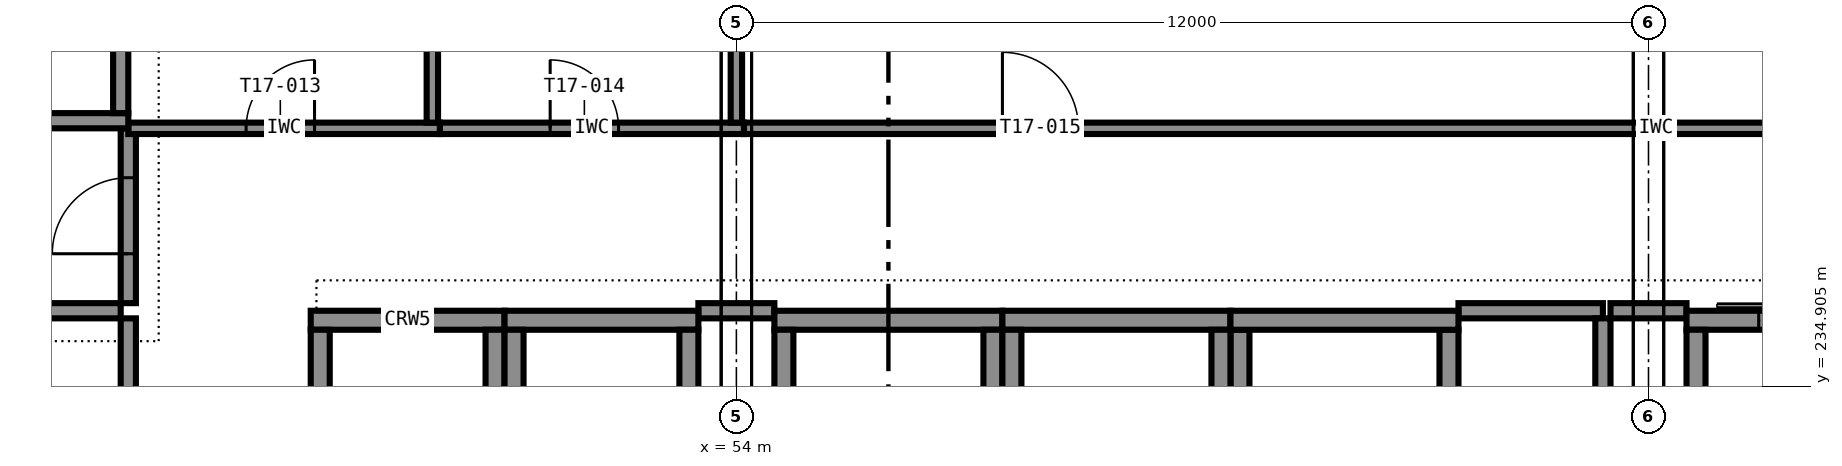
"""IFC4 building model, lengths in metres.
Left out: names, types, materials, properties, quantities, classifications, styles, units other than length and angle.
Written with IfcOpenShell. Run it as: python <this file> out.ifc"""

import sys

from ifc_helpers import new_model, si_unit, direction, frame, frame_2d, origin, place, context, subcontext, project, spatial, rectangle, extrude, element, fill, save


model = new_model("IFC4")
c1 = context("Model", 3, precision=1e-05, world=origin(), true_north=direction((0.0, 1.0)))
c2 = subcontext(c1, "Body", "Model", "MODEL_VIEW")
j1 = project(units=[si_unit("LENGTHUNIT", "METRE"), si_unit("PLANEANGLEUNIT", "RADIAN")], contexts=[c1])
p1 = place(None, origin())
s1 = spatial("IfcSite", under=j1, at=p1, CompositionType="ELEMENT")
p2 = place(p1, origin())
s2 = spatial("IfcBuilding", under=s1, at=p2, CompositionType="ELEMENT")
p3 = place(p2, frame((0.0, 0.0, 67.8)))
s3 = spatial("IfcBuildingStorey", under=s2, at=p3, CompositionType="ELEMENT", Elevation=67.8)
p4 = place(p3, frame((54.5, 235.775, 0.0), z_axis=(0.0, 0.0, 1.0), x_axis=(1.0, 0.0, 0.0)))
e1 = element("IfcWall", 1, at=p4, inside=s3, PredefinedType="SHEAR", context=c2, shape_type="SweptSolid", body=[
    extrude(rectangle(XDim=3.0, YDim=0.25, at=frame_2d((1.5, 0.0))), origin(), (0.0, 0.0, 1.0), 3.6),
])
for number, where, z_axis, x_axis in (
    (2, (54.625, 232.35, 0.0), (0.0, 0.0, 1.0), (0.0, 1.0, 0.0)),
    (3, (57.375, 232.35, 0.0), (0.0, 0.0, 1.0), (0.0, 1.0, 0.0)),
):
    element("IfcWall", number, at=place(p3, frame(where, z_axis=z_axis, x_axis=x_axis)), inside=s3, PredefinedType="SHEAR", context=c2, shape_type="SweptSolid", body=[
        extrude(rectangle(XDim=3.3, YDim=0.25, at=frame_2d((1.65, 0.0))), origin(), (0.0, 0.0, 1.0), 3.6),
    ])
p5 = place(p3, frame((57.5, 235.775, 0.0), z_axis=(0.0, 0.0, 1.0), x_axis=(1.0, 0.0, 0.0)))
e4 = element("IfcWall", 4, at=p5, inside=s3, PredefinedType="SHEAR", context=c2, shape_type="SweptSolid", body=[
    extrude(rectangle(XDim=3.0, YDim=0.25, at=frame_2d((1.5, 0.0))), origin(), (0.0, 0.0, 1.0), 3.6),
])
for number, where, z_axis, x_axis in (
    (5, (57.625, 232.35, 0.0), (0.0, 0.0, 1.0), (0.0, 1.0, 0.0)),
    (6, (60.375, 232.35, 0.0), (0.0, 0.0, 1.0), (0.0, 1.0, 0.0)),
):
    element("IfcWall", number, at=place(p3, frame(where, z_axis=z_axis, x_axis=x_axis)), inside=s3, PredefinedType="SHEAR", context=c2, shape_type="SweptSolid", body=[
        extrude(rectangle(XDim=3.3, YDim=0.25, at=frame_2d((1.65, 0.0))), origin(), (0.0, 0.0, 1.0), 3.6),
    ])
p6 = place(p3, frame((60.5, 235.775, 0.0), z_axis=(0.0, 0.0, 1.0), x_axis=(1.0, 0.0, 0.0)))
e7 = element("IfcWall", 7, at=p6, inside=s3, PredefinedType="SHEAR", context=c2, shape_type="SweptSolid", body=[
    extrude(rectangle(XDim=3.0, YDim=0.25, at=frame_2d((1.5, 0.0))), origin(), (0.0, 0.0, 1.0), 3.6),
])
for number, where, z_axis, x_axis in (
    (8, (60.625, 232.35, 0.0), (0.0, 0.0, 1.0), (0.0, 1.0, 0.0)),
    (9, (63.375, 232.35, 0.0), (0.0, 0.0, 1.0), (0.0, 1.0, 0.0)),
):
    element("IfcWall", number, at=place(p3, frame(where, z_axis=z_axis, x_axis=x_axis)), inside=s3, PredefinedType="SHEAR", context=c2, shape_type="SweptSolid", body=[
        extrude(rectangle(XDim=3.3, YDim=0.25, at=frame_2d((1.65, 0.0))), origin(), (0.0, 0.0, 1.0), 3.6),
    ])
p7 = place(p3, frame((66.5, 235.775, 0.0), z_axis=(0.0, 0.0, 1.0), x_axis=(1.0, 0.0, 0.0)))
e10 = element("IfcWall", 10, at=p7, inside=s3, PredefinedType="SHEAR", context=c2, shape_type="SweptSolid", body=[
    extrude(rectangle(XDim=3.0, YDim=0.25, at=frame_2d((1.5, 0.0))), origin(), (0.0, 0.0, 1.0), 3.6),
])
p8 = place(p7, frame((0.95, 0.0, 0.0)))
e11 = element("IfcOpeningElement", 11, at=p8, cuts=e10, PredefinedType="OPENING", context=c2, shape_type="SweptSolid", body=[
    extrude(rectangle(XDim=1.1, YDim=2.1, at=frame_2d((0.55, 1.05))), frame((0.0, 0.135, 0.0), z_axis=(0.0, -1.0, 0.0), x_axis=(1.0, 0.0, 0.0)), (0.0, 0.0, 1.0), 0.27),
])
p9 = place(p3, frame((66.625, 232.35, 0.0), z_axis=(0.0, 0.0, 1.0), x_axis=(0.0, 1.0, 0.0)))
e12 = element("IfcWall", 12, at=p9, inside=s3, PredefinedType="SHEAR", context=c2, shape_type="SweptSolid", body=[
    extrude(rectangle(XDim=3.3, YDim=0.25, at=frame_2d((1.65, 0.0))), origin(), (0.0, 0.0, 1.0), 3.6),
])
p10 = place(p3, frame((48.4, 235.775, 0.0), z_axis=(0.0, 0.0, 1.0), x_axis=(1.0, 0.0, 0.0)))
e13 = element("IfcWall", 13, at=p10, inside=s3, PredefinedType="SHEAR", context=c2, shape_type="SweptSolid", body=[
    extrude(rectangle(XDim=2.55, YDim=0.25, at=frame_2d((1.275, 0.0))), origin(), (0.0, 0.0, 1.0), 3.6),
])
for number, where, z_axis, x_axis in (
    (14, (48.525, 232.35, 0.0), (0.0, 0.0, 1.0), (0.0, 1.0, 0.0)),
    (15, (50.825, 232.35, 0.0), (0.0, 0.0, 1.0), (0.0, 1.0, 0.0)),
):
    element("IfcWall", number, at=place(p3, frame(where, z_axis=z_axis, x_axis=x_axis)), inside=s3, PredefinedType="SHEAR", context=c2, shape_type="SweptSolid", body=[
        extrude(rectangle(XDim=3.3, YDim=0.25, at=frame_2d((1.65, 0.0))), origin(), (0.0, 0.0, 1.0), 3.6),
    ])
p11 = place(p3, frame((50.95, 235.775, 0.0), z_axis=(0.0, 0.0, 1.0), x_axis=(1.0, 0.0, 0.0)))
e16 = element("IfcWall", 16, at=p11, inside=s3, PredefinedType="SHEAR", context=c2, shape_type="SweptSolid", body=[
    extrude(rectangle(XDim=2.55, YDim=0.25, at=frame_2d((1.275, 0.0))), origin(), (0.0, 0.0, 1.0), 3.6),
])
for number, where, z_axis, x_axis in (
    (17, (51.075, 232.35, 0.0), (0.0, 0.0, 1.0), (0.0, 1.0, 0.0)),
    (18, (53.375, 232.35, 0.0), (0.0, 0.0, 1.0), (0.0, 1.0, 0.0)),
):
    element("IfcWall", number, at=place(p3, frame(where, z_axis=z_axis, x_axis=x_axis)), inside=s3, PredefinedType="SHEAR", context=c2, shape_type="SweptSolid", body=[
        extrude(rectangle(XDim=3.3, YDim=0.25, at=frame_2d((1.65, 0.0))), origin(), (0.0, 0.0, 1.0), 3.6),
    ])
p12 = place(p3, frame((42.5, 238.4, 0.0), z_axis=(0.0, 0.0, 1.0), x_axis=(1.0, 0.0, 0.0)))
e19 = element("IfcWall", 19, at=p12, inside=s3, PredefinedType="SHEAR", context=c2, shape_type="SweptSolid", body=[
    extrude(rectangle(XDim=3.5, YDim=0.2, at=frame_2d((1.75, 0.0))), origin(), (0.0, 0.0, 1.0), 3.6),
])
p13 = place(p12, frame((1.15, 0.0, 0.0)))
e20 = element("IfcOpeningElement", 20, at=p13, cuts=e19, PredefinedType="OPENING", context=c2, shape_type="SweptSolid", body=[
    extrude(rectangle(XDim=1.2, YDim=2.1, at=frame_2d((0.6, 1.05))), frame((0.0, 0.11, 0.0), z_axis=(0.0, -1.0, 0.0), x_axis=(1.0, 0.0, 0.0)), (0.0, 0.0, 1.0), 0.22),
])
p14 = place(p3, frame((45.9, 238.5, 0.0), z_axis=(0.0, 0.0, 1.0), x_axis=(0.0, 1.0, 0.0)))
e21 = element("IfcWall", 21, at=p14, inside=s3, PredefinedType="SHEAR", context=c2, shape_type="SweptSolid", body=[
    extrude(rectangle(XDim=7.0, YDim=0.2, at=frame_2d((3.5, 0.0))), origin(), (0.0, 0.0, 1.0), 3.6),
])
p15 = place(p3, frame((42.2, 235.9, 0.0), z_axis=(0.0, 0.0, 1.0), x_axis=(1.0, 0.0, 0.0)))
e22 = element("IfcWall", 22, at=p15, inside=s3, PredefinedType="PARTITIONING", context=c2, shape_type="SweptSolid", body=[
    extrude(rectangle(XDim=3.7, YDim=0.2, at=frame_2d((1.85, 0.0))), origin(), (0.0, 0.0, 1.0), 3.4),
])
p16 = place(p3, frame((53.5, 235.9, 0.0), z_axis=(0.0, 0.0, 1.0), x_axis=(1.0, 0.0, 0.0)))
e23 = element("IfcWall", 23, at=p16, inside=s3, PredefinedType="PARTITIONING", context=c2, shape_type="SweptSolid", body=[
    extrude(rectangle(XDim=1.0, YDim=0.2, at=frame_2d((0.5, 0.0))), origin(), (0.0, 0.0, 1.0), 3.4),
])
p17 = place(p3, frame((63.5, 235.9, 0.0), z_axis=(0.0, 0.0, 1.0), x_axis=(1.0, 0.0, 0.0)))
e24 = element("IfcWall", 24, at=p17, inside=s3, PredefinedType="PARTITIONING", context=c2, shape_type="SweptSolid", body=[
    extrude(rectangle(XDim=1.9, YDim=0.2, at=frame_2d((0.95, 0.0))), origin(), (0.0, 0.0, 1.0), 3.4),
])
p18 = place(p3, frame((65.5, 235.9, 0.0), z_axis=(0.0, 0.0, 1.0), x_axis=(1.0, 0.0, 0.0)))
e25 = element("IfcWall", 25, at=p18, inside=s3, PredefinedType="PARTITIONING", context=c2, shape_type="SweptSolid", body=[
    extrude(rectangle(XDim=1.0, YDim=0.2, at=frame_2d((0.5, 0.0))), origin(), (0.0, 0.0, 1.0), 3.4),
])
p19 = place(p3, frame((46.0, 232.2, 0.0), z_axis=(0.0, 0.0, 1.0), x_axis=(0.0, 1.0, 0.0)))
e26 = element("IfcWall", 26, at=p19, inside=s3, PredefinedType="PARTITIONING", context=c2, shape_type="SweptSolid", body=[
    extrude(rectangle(XDim=3.6, YDim=0.2, at=frame_2d((1.8, 0.0))), origin(), (0.0, 0.0, 1.0), 3.4),
])
p20 = place(p19, frame((1.35, 0.0, 0.0)))
e27 = element("IfcOpeningElement", 27, at=p20, cuts=e26, PredefinedType="OPENING", context=c2, shape_type="SweptSolid", body=[
    extrude(rectangle(XDim=0.9, YDim=2.1, at=frame_2d((0.45, 1.05))), frame((0.0, 0.11, 0.0), z_axis=(0.0, -1.0, 0.0), x_axis=(1.0, 0.0, 0.0)), (0.0, 0.0, 1.0), 0.22),
])
p21 = place(p3, frame((46.0, 236.0, 0.0), z_axis=(0.0, 0.0, 1.0), x_axis=(0.0, 1.0, 0.0)))
e28 = element("IfcWall", 28, at=p21, inside=s3, PredefinedType="PARTITIONING", context=c2, shape_type="SweptSolid", body=[
    extrude(rectangle(XDim=2.3, YDim=0.2, at=frame_2d((1.15, 0.0))), origin(), (0.0, 0.0, 1.0), 3.4),
])
p22 = place(p21, frame((0.65, 0.0, 0.0)))
e29 = element("IfcOpeningElement", 29, at=p22, cuts=e28, PredefinedType="OPENING", context=c2, shape_type="SweptSolid", body=[
    extrude(rectangle(XDim=1.0, YDim=2.1, at=frame_2d((0.5, 1.05))), frame((0.0, 0.11, 0.0), z_axis=(0.0, -1.0, 0.0), x_axis=(1.0, 0.0, 0.0)), (0.0, 0.0, 1.0), 0.22),
])
p23 = place(p3, frame((65.4, 232.2, 0.0), z_axis=(0.0, 0.0, 1.0), x_axis=(0.0, 1.0, 0.0)))
e30 = element("IfcWall", 30, at=p23, inside=s3, PredefinedType="PARTITIONING", context=c2, shape_type="SweptSolid", body=[
    extrude(rectangle(XDim=3.6, YDim=0.2, at=frame_2d((1.8, 0.0))), origin(), (0.0, 0.0, 1.0), 3.4),
])
p24 = place(p3, frame((46.0, 238.3, 0.0), z_axis=(0.0, 0.0, 1.0), x_axis=(1.0, 0.0, 0.0)))
e31 = element("IfcWall", 31, at=p24, inside=s3, PredefinedType="PARTITIONING", context=c2, shape_type="SweptSolid", body=[
    extrude(rectangle(XDim=4.1, YDim=0.15, at=frame_2d((2.05, 0.0))), origin(), (0.0, 0.0, 1.0), 3.4),
])
p25 = place(p24, frame((1.55, 0.0, 0.0)))
e32 = element("IfcOpeningElement", 32, at=p25, cuts=e31, PredefinedType="OPENING", context=c2, shape_type="SweptSolid", body=[
    extrude(rectangle(XDim=0.9, YDim=2.1, at=frame_2d((0.45, 1.05))), frame((0.0, 0.085, 0.0), z_axis=(0.0, -1.0, 0.0), x_axis=(1.0, 0.0, 0.0)), (0.0, 0.0, 1.0), 0.17),
])
p26 = place(p3, frame((50.1, 238.3, 0.0), z_axis=(0.0, 0.0, 1.0), x_axis=(1.0, 0.0, 0.0)))
e33 = element("IfcWall", 33, at=p26, inside=s3, PredefinedType="PARTITIONING", context=c2, shape_type="SweptSolid", body=[
    extrude(rectangle(XDim=4.0, YDim=0.15, at=frame_2d((2.0, 0.0))), origin(), (0.0, 0.0, 1.0), 3.4),
])
p27 = place(p26, frame((1.45, 0.0, 0.0)))
e34 = element("IfcOpeningElement", 34, at=p27, cuts=e33, PredefinedType="OPENING", context=c2, shape_type="SweptSolid", body=[
    extrude(rectangle(XDim=0.9, YDim=2.1, at=frame_2d((0.45, 1.05))), frame((0.0, 0.085, 0.0), z_axis=(0.0, -1.0, 0.0), x_axis=(1.0, 0.0, 0.0)), (0.0, 0.0, 1.0), 0.17),
])
p28 = place(p3, frame((50.0, 245.8, 0.0), z_axis=(0.0, 0.0, 1.0), x_axis=(0.0, -1.0, 0.0)))
e35 = element("IfcWall", 35, at=p28, inside=s3, PredefinedType="PARTITIONING", context=c2, shape_type="SweptSolid", body=[
    extrude(rectangle(XDim=7.425, YDim=0.15, at=frame_2d((3.712, 0.0))), origin(), (0.0, 0.0, 1.0), 3.4),
])
p29 = place(p3, frame((54.1, 238.3, 0.0), z_axis=(0.0, 0.0, 1.0), x_axis=(1.0, 0.0, 0.0)))
e36 = element("IfcWall", 36, at=p29, inside=s3, PredefinedType="PARTITIONING", context=c2, shape_type="SweptSolid", body=[
    extrude(rectangle(XDim=24.0, YDim=0.15, at=frame_2d((12.0, 0.0))), origin(), (0.0, 0.0, 1.0), 3.4),
])
p30 = place(p29, frame((3.4, 0.0, 0.0)))
e37 = element("IfcOpeningElement", 37, at=p30, cuts=e36, PredefinedType="OPENING", context=c2, shape_type="SweptSolid", body=[
    extrude(rectangle(XDim=1.0, YDim=2.1, at=frame_2d((0.5, 1.05))), frame((0.0, 0.085, 0.0), z_axis=(0.0, -1.0, 0.0), x_axis=(1.0, 0.0, 0.0)), (0.0, 0.0, 1.0), 0.17),
])
p31 = place(p29, frame((19.4, 0.0, 0.0)))
e38 = element("IfcOpeningElement", 38, at=p31, cuts=e36, PredefinedType="OPENING", context=c2, shape_type="SweptSolid", body=[
    extrude(rectangle(XDim=1.0, YDim=2.1, at=frame_2d((0.5, 1.05))), frame((0.0, 0.085, 0.0), z_axis=(0.0, -1.0, 0.0), x_axis=(1.0, 0.0, 0.0)), (0.0, 0.0, 1.0), 0.17),
])
p32 = place(p3, frame((54.0, 245.65, 0.0), z_axis=(0.0, 0.0, 1.0), x_axis=(0.0, -1.0, 0.0)))
e39 = element("IfcWall", 39, at=p32, inside=s3, PredefinedType="PARTITIONING", context=c2, shape_type="SweptSolid", body=[
    extrude(rectangle(XDim=7.275, YDim=0.15, at=frame_2d((3.637, 0.0))), origin(), (0.0, 0.0, 1.0), 2.6),
])
p33 = place(p22, origin())
e40 = element("IfcDoor", 40, at=p33, inside=s3, OperationType="SINGLE_SWING_LEFT", PredefinedType="DOOR", context=c2, shape_type="SweptSolid", body=[
    extrude(rectangle(XDim=1.0, YDim=2.1, at=frame_2d((0.5, 1.05))), frame((0.0, 0.025, 0.0), z_axis=(0.0, -1.0, 0.0), x_axis=(1.0, 0.0, 0.0)), (0.0, 0.0, 1.0), 0.05),
])
fill(e29, e40)
p34 = place(p25, origin())
e41 = element("IfcDoor", 41, at=p34, inside=s3, OperationType="SINGLE_SWING_RIGHT", PredefinedType="DOOR", context=c2, shape_type="SweptSolid", body=[
    extrude(rectangle(XDim=0.9, YDim=2.1, at=frame_2d((0.45, 1.05))), frame((0.0, 0.025, 0.0), z_axis=(0.0, -1.0, 0.0), x_axis=(1.0, 0.0, 0.0)), (0.0, 0.0, 1.0), 0.05),
])
fill(e32, e41)
p35 = place(p27, origin())
e42 = element("IfcDoor", 42, at=p35, inside=s3, OperationType="SINGLE_SWING_LEFT", PredefinedType="DOOR", context=c2, shape_type="SweptSolid", body=[
    extrude(rectangle(XDim=0.9, YDim=2.1, at=frame_2d((0.45, 1.05))), frame((0.0, 0.025, 0.0), z_axis=(0.0, -1.0, 0.0), x_axis=(1.0, 0.0, 0.0)), (0.0, 0.0, 1.0), 0.05),
])
fill(e34, e42)
p36 = place(p30, origin())
e43 = element("IfcDoor", 43, at=p36, inside=s3, OperationType="SINGLE_SWING_LEFT", PredefinedType="DOOR", context=c2, shape_type="SweptSolid", body=[
    extrude(rectangle(XDim=1.0, YDim=2.1, at=frame_2d((0.5, 1.05))), frame((0.0, 0.025, 0.0), z_axis=(0.0, -1.0, 0.0), x_axis=(1.0, 0.0, 0.0)), (0.0, 0.0, 1.0), 0.05),
])
fill(e37, e43)
p37 = place(p8, origin())
e44 = element("IfcDoor", 44, at=p37, inside=s3, OperationType="SLIDING_TO_LEFT", PredefinedType="DOOR", context=c2, shape_type="SweptSolid", body=[
    extrude(rectangle(XDim=1.1, YDim=2.1, at=frame_2d((0.55, 1.05))), frame((0.0, 0.025, 0.0), z_axis=(0.0, -1.0, 0.0), x_axis=(1.0, 0.0, 0.0)), (0.0, 0.0, 1.0), 0.05),
])
fill(e11, e44)
save(model, sys.argv[1])
